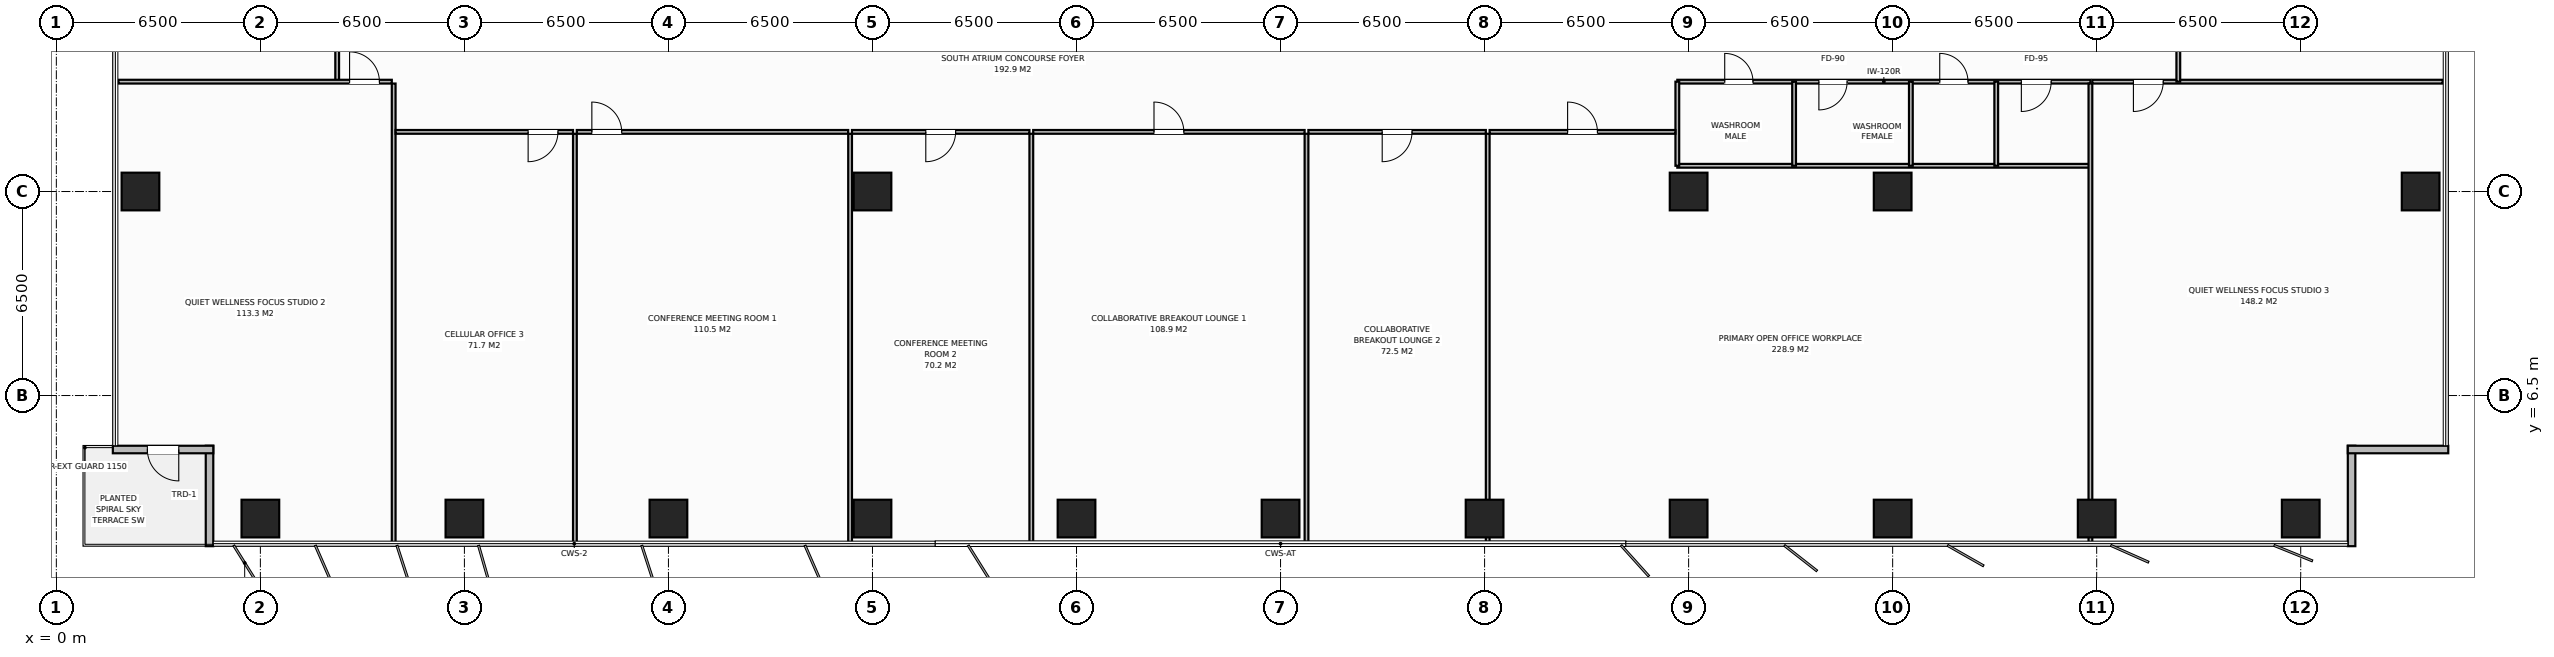
"""IFC4 building model, lengths in metres.
Left out: names, types, materials, properties, quantities, classifications, styles, units other than length and angle.
Written with IfcOpenShell. Run it as: python <this file> out.ifc"""

import sys

from ifc_helpers import new_model, si_unit, direction, frame, frame_2d, origin, origin_2d, place, context, subcontext, project, spatial, rectangle, extrude, element, fill, save


model = new_model("IFC4")
c1 = context("Model", 3, precision=1e-05, world=origin(), true_north=direction((0.0, 1.0)))
c2 = subcontext(c1, "Body", "Model", "MODEL_VIEW")
j1 = project(units=[si_unit("LENGTHUNIT", "METRE"), si_unit("PLANEANGLEUNIT", "RADIAN")], contexts=[c1])
p1 = place(None, origin())
s1 = spatial("IfcSite", under=j1, at=p1, CompositionType="ELEMENT")
p2 = place(p1, origin())
s2 = spatial("IfcBuilding", under=s1, at=p2, CompositionType="ELEMENT")
p3 = place(p2, frame((0.0, 0.0, 101.2)))
s3 = spatial("IfcBuildingStorey", under=s2, at=p3, CompositionType="ELEMENT", Elevation=101.2)
for number, where, z_axis, x_axis in (
    (1, (58.5, 13.0, 0.0), (0.0, 0.0, 1.0), (1.0, 0.0, 0.0)),
    (2, (26.0, 13.0, 0.0), (0.0, 0.0, 1.0), (1.0, 0.0, 0.0)),
    (3, (52.0, 13.0, 0.0), (0.0, 0.0, 1.0), (1.0, 0.0, 0.0)),
    (4, (6.5, 2.58, 0.0), (0.0, 0.0, 1.0), (1.0, 0.0, 0.0)),
    (5, (13.0, 2.58, 0.0), (0.0, 0.0, 1.0), (1.0, 0.0, 0.0)),
    (6, (19.5, 2.58, 0.0), (0.0, 0.0, 1.0), (1.0, 0.0, 0.0)),
    (7, (26.0, 2.58, 0.0), (0.0, 0.0, 1.0), (1.0, 0.0, 0.0)),
    (8, (32.5, 2.58, 0.0), (0.0, 0.0, 1.0), (1.0, 0.0, 0.0)),
    (9, (39.0, 2.58, 0.0), (0.0, 0.0, 1.0), (1.0, 0.0, 0.0)),
    (10, (45.5, 2.58, 0.0), (0.0, 0.0, 1.0), (1.0, 0.0, 0.0)),
    (11, (52.0, 2.58, 0.0), (0.0, 0.0, 1.0), (1.0, 0.0, 0.0)),
    (12, (58.5, 2.58, 0.0), (0.0, 0.0, 1.0), (1.0, 0.0, 0.0)),
    (13, (65.0, 2.58, 0.0), (0.0, 0.0, 1.0), (1.0, 0.0, 0.0)),
    (14, (71.5, 2.58, 0.0), (0.0, 0.0, 1.0), (1.0, 0.0, 0.0)),
    (15, (2.68, 13.0, 0.0), (0.0, 0.0, 1.0), (1.0, 0.0, 0.0)),
    (16, (75.32, 13.0, 0.0), (0.0, 0.0, 1.0), (1.0, 0.0, 0.0)),
):
    element("IfcColumn", number, at=place(p3, frame(where, z_axis=z_axis, x_axis=x_axis)), inside=s3, PredefinedType="COLUMN", context=c2, shape_type="SweptSolid", body=[
        extrude(rectangle(XDim=1.2, YDim=1.2, at=origin_2d()), origin(), (0.0, 0.0, 1.0), 3.8),
    ])
p4 = place(p3, frame((4.88, 1.7, 0.0), z_axis=(0.0, 0.0, 1.0), x_axis=(0.0, 1.0, 0.0)))
e17 = element("IfcWall", 17, at=p4, inside=s3, PredefinedType="STANDARD", context=c2, shape_type="SweptSolid", body=[
    extrude(rectangle(XDim=3.2, YDim=0.24, at=frame_2d((1.6, 0.0))), origin(), (0.0, 0.0, 1.0), 3.565),
])
p5 = place(p3, frame((5.0, 4.78, 0.0), z_axis=(0.0, 0.0, 1.0), x_axis=(-1.0, 0.0, 0.0)))
e18 = element("IfcWall", 18, at=p5, inside=s3, PredefinedType="STANDARD", context=c2, shape_type="SweptSolid", body=[
    extrude(rectangle(XDim=3.2, YDim=0.24, at=frame_2d((1.6, 0.0))), origin(), (0.0, 0.0, 1.0), 3.565),
])
p6 = place(p5, frame((1.1, 0.0, 0.0)))
e19 = element("IfcOpeningElement", 19, at=p6, cuts=e18, PredefinedType="OPENING", context=c2, shape_type="SweptSolid", body=[
    extrude(rectangle(XDim=1.0, YDim=2.2, at=frame_2d((0.5, 1.1))), frame((0.0, 0.13, 0.0), z_axis=(0.0, -1.0, 0.0), x_axis=(1.0, 0.0, 0.0)), (0.0, 0.0, 1.0), 0.26),
])
for number, where, z_axis, x_axis in (
    (20, (73.12, 4.9, 0.0), (0.0, 0.0, 1.0), (0.0, -1.0, 0.0)),
    (21, (76.2, 4.78, 0.0), (0.0, 0.0, 1.0), (-1.0, 0.0, 0.0)),
):
    element("IfcWall", number, at=place(p3, frame(where, z_axis=z_axis, x_axis=x_axis)), inside=s3, PredefinedType="STANDARD", context=c2, shape_type="SweptSolid", body=[
        extrude(rectangle(XDim=3.2, YDim=0.24, at=frame_2d((1.6, 0.0))), origin(), (0.0, 0.0, 1.0), 3.565),
    ])
p7 = place(p3, frame((8.947, 16.5, 0.0), z_axis=(0.0, 0.0, 1.0), x_axis=(0.0, 1.0, 0.0)))
e22 = element("IfcWall", 22, at=p7, inside=s3, PredefinedType="PARTITIONING", context=c2, shape_type="SweptSolid", body=[
    extrude(rectangle(XDim=2.1, YDim=0.12, at=frame_2d((1.05, 0.0))), origin(), (0.0, 0.0, 1.0), 3.565),
])
p8 = place(p3, frame((51.64, 16.5, 0.0), z_axis=(0.0, 0.0, 1.0), x_axis=(1.0, 0.0, 0.0)))
e23 = element("IfcWall", 23, at=p8, inside=s3, PredefinedType="PARTITIONING", context=c2, shape_type="SweptSolid", body=[
    extrude(rectangle(XDim=13.16, YDim=0.12, at=frame_2d((6.58, 0.0))), origin(), (0.0, 0.0, 1.0), 3.565),
])
p9 = place(p8, frame((1.51, 0.0, 0.0)))
e24 = element("IfcOpeningElement", 24, at=p9, cuts=e23, PredefinedType="OPENING", context=c2, shape_type="SweptSolid", body=[
    extrude(rectangle(XDim=0.9, YDim=2.15, at=frame_2d((0.45, 1.075))), frame((0.0, 0.07, 0.0), z_axis=(0.0, -1.0, 0.0), x_axis=(1.0, 0.0, 0.0)), (0.0, 0.0, 1.0), 0.14),
])
p10 = place(p8, frame((4.51, 0.0, 0.0)))
e25 = element("IfcOpeningElement", 25, at=p10, cuts=e23, PredefinedType="OPENING", context=c2, shape_type="SweptSolid", body=[
    extrude(rectangle(XDim=0.9, YDim=2.15, at=frame_2d((0.45, 1.075))), frame((0.0, 0.07, 0.0), z_axis=(0.0, -1.0, 0.0), x_axis=(1.0, 0.0, 0.0)), (0.0, 0.0, 1.0), 0.14),
])
p11 = place(p8, frame((8.36, 0.0, 0.0)))
e26 = element("IfcOpeningElement", 26, at=p11, cuts=e23, PredefinedType="OPENING", context=c2, shape_type="SweptSolid", body=[
    extrude(rectangle(XDim=0.9, YDim=2.15, at=frame_2d((0.45, 1.075))), frame((0.0, 0.07, 0.0), z_axis=(0.0, -1.0, 0.0), x_axis=(1.0, 0.0, 0.0)), (0.0, 0.0, 1.0), 0.14),
])
p12 = place(p8, frame((10.96, 0.0, 0.0)))
e27 = element("IfcOpeningElement", 27, at=p12, cuts=e23, PredefinedType="OPENING", context=c2, shape_type="SweptSolid", body=[
    extrude(rectangle(XDim=0.95, YDim=2.15, at=frame_2d((0.475, 1.075))), frame((0.0, 0.07, 0.0), z_axis=(0.0, -1.0, 0.0), x_axis=(1.0, 0.0, 0.0)), (0.0, 0.0, 1.0), 0.14),
])
p13 = place(p3, frame((51.64, 13.82, 0.0), z_axis=(0.0, 0.0, 1.0), x_axis=(1.0, 0.0, 0.0)))
e28 = element("IfcWall", 28, at=p13, inside=s3, PredefinedType="PARTITIONING", context=c2, shape_type="SweptSolid", body=[
    extrude(rectangle(XDim=13.16, YDim=0.12, at=frame_2d((6.58, 0.0))), origin(), (0.0, 0.0, 1.0), 3.565),
])
for number, where, z_axis, x_axis in (
    (29, (51.64, 13.82, 0.0), (0.0, 0.0, 1.0), (0.0, 1.0, 0.0)),
    (30, (55.36, 13.82, 0.0), (0.0, 0.0, 1.0), (0.0, 1.0, 0.0)),
    (31, (59.08, 13.82, 0.0), (0.0, 0.0, 1.0), (0.0, 1.0, 0.0)),
    (32, (61.8, 13.82, 0.0), (0.0, 0.0, 1.0), (0.0, 1.0, 0.0)),
):
    element("IfcWall", number, at=place(p3, frame(where, z_axis=z_axis, x_axis=x_axis)), inside=s3, PredefinedType="PARTITIONING", context=c2, shape_type="SweptSolid", body=[
        extrude(rectangle(XDim=2.68, YDim=0.12, at=frame_2d((1.34, 0.0))), origin(), (0.0, 0.0, 1.0), 3.565),
    ])
p14 = place(p3, frame((10.747, 1.72, 0.0), z_axis=(0.0, 0.0, 1.0), x_axis=(0.0, 1.0, 0.0)))
e33 = element("IfcWall", 33, at=p14, inside=s3, PredefinedType="PARTITIONING", context=c2, shape_type="SweptSolid", body=[
    extrude(rectangle(XDim=14.72, YDim=0.12, at=frame_2d((7.36, 0.0))), origin(), (0.0, 0.0, 1.0), 3.565),
])
p15 = place(p3, frame((1.98, 16.5, 0.0), z_axis=(0.0, 0.0, 1.0), x_axis=(1.0, 0.0, 0.0)))
e34 = element("IfcWall", 34, at=p15, inside=s3, PredefinedType="PARTITIONING", context=c2, shape_type="SweptSolid", body=[
    extrude(rectangle(XDim=8.707, YDim=0.12, at=frame_2d((4.354, 0.0))), origin(), (0.0, 0.0, 1.0), 3.565),
])
p16 = place(p15, frame((7.362, 0.0, 0.0)))
e35 = element("IfcOpeningElement", 35, at=p16, cuts=e34, PredefinedType="OPENING", context=c2, shape_type="SweptSolid", body=[
    extrude(rectangle(XDim=0.95, YDim=2.15, at=frame_2d((0.475, 1.075))), frame((0.0, 0.07, 0.0), z_axis=(0.0, -1.0, 0.0), x_axis=(1.0, 0.0, 0.0)), (0.0, 0.0, 1.0), 0.14),
])
p17 = place(p3, frame((16.52, 1.72, 0.0), z_axis=(0.0, 0.0, 1.0), x_axis=(0.0, 1.0, 0.0)))
e36 = element("IfcWall", 36, at=p17, inside=s3, PredefinedType="PARTITIONING", context=c2, shape_type="SweptSolid", body=[
    extrude(rectangle(XDim=13.12, YDim=0.12, at=frame_2d((6.56, 0.0))), origin(), (0.0, 0.0, 1.0), 3.565),
])
p18 = place(p3, frame((10.807, 14.9, 0.0), z_axis=(0.0, 0.0, 1.0), x_axis=(1.0, 0.0, 0.0)))
e37 = element("IfcWall", 37, at=p18, inside=s3, PredefinedType="PARTITIONING", context=c2, shape_type="SweptSolid", body=[
    extrude(rectangle(XDim=5.653, YDim=0.12, at=frame_2d((2.827, 0.0))), origin(), (0.0, 0.0, 1.0), 3.565),
])
p19 = place(p18, frame((4.223, 0.0, 0.0)))
e38 = element("IfcOpeningElement", 38, at=p19, cuts=e37, PredefinedType="OPENING", context=c2, shape_type="SweptSolid", body=[
    extrude(rectangle(XDim=0.95, YDim=2.15, at=frame_2d((0.475, 1.075))), frame((0.0, 0.07, 0.0), z_axis=(0.0, -1.0, 0.0), x_axis=(1.0, 0.0, 0.0)), (0.0, 0.0, 1.0), 0.14),
])
p20 = place(p3, frame((25.287, 1.72, 0.0), z_axis=(0.0, 0.0, 1.0), x_axis=(0.0, 1.0, 0.0)))
e39 = element("IfcWall", 39, at=p20, inside=s3, PredefinedType="PARTITIONING", context=c2, shape_type="SweptSolid", body=[
    extrude(rectangle(XDim=13.12, YDim=0.12, at=frame_2d((6.56, 0.0))), origin(), (0.0, 0.0, 1.0), 3.565),
])
p21 = place(p3, frame((16.58, 14.9, 0.0), z_axis=(0.0, 0.0, 1.0), x_axis=(1.0, 0.0, 0.0)))
e40 = element("IfcWall", 40, at=p21, inside=s3, PredefinedType="PARTITIONING", context=c2, shape_type="SweptSolid", body=[
    extrude(rectangle(XDim=8.647, YDim=0.12, at=frame_2d((4.323, 0.0))), origin(), (0.0, 0.0, 1.0), 3.565),
])
p22 = place(p21, frame((0.48, 0.0, 0.0)))
e41 = element("IfcOpeningElement", 41, at=p22, cuts=e40, PredefinedType="OPENING", context=c2, shape_type="SweptSolid", body=[
    extrude(rectangle(XDim=0.95, YDim=2.15, at=frame_2d((0.475, 1.075))), frame((0.0, 0.07, 0.0), z_axis=(0.0, -1.0, 0.0), x_axis=(1.0, 0.0, 0.0)), (0.0, 0.0, 1.0), 0.14),
])
p23 = place(p3, frame((31.06, 1.72, 0.0), z_axis=(0.0, 0.0, 1.0), x_axis=(0.0, 1.0, 0.0)))
e42 = element("IfcWall", 42, at=p23, inside=s3, PredefinedType="PARTITIONING", context=c2, shape_type="SweptSolid", body=[
    extrude(rectangle(XDim=13.12, YDim=0.12, at=frame_2d((6.56, 0.0))), origin(), (0.0, 0.0, 1.0), 3.565),
])
p24 = place(p3, frame((25.347, 14.9, 0.0), z_axis=(0.0, 0.0, 1.0), x_axis=(1.0, 0.0, 0.0)))
e43 = element("IfcWall", 43, at=p24, inside=s3, PredefinedType="PARTITIONING", context=c2, shape_type="SweptSolid", body=[
    extrude(rectangle(XDim=5.653, YDim=0.12, at=frame_2d((2.827, 0.0))), origin(), (0.0, 0.0, 1.0), 3.565),
])
p25 = place(p24, frame((2.352, 0.0, 0.0)))
e44 = element("IfcOpeningElement", 44, at=p25, cuts=e43, PredefinedType="OPENING", context=c2, shape_type="SweptSolid", body=[
    extrude(rectangle(XDim=0.95, YDim=2.15, at=frame_2d((0.475, 1.075))), frame((0.0, 0.07, 0.0), z_axis=(0.0, -1.0, 0.0), x_axis=(1.0, 0.0, 0.0)), (0.0, 0.0, 1.0), 0.14),
])
p26 = place(p3, frame((39.827, 1.72, 0.0), z_axis=(0.0, 0.0, 1.0), x_axis=(0.0, 1.0, 0.0)))
e45 = element("IfcWall", 45, at=p26, inside=s3, PredefinedType="PARTITIONING", context=c2, shape_type="SweptSolid", body=[
    extrude(rectangle(XDim=13.12, YDim=0.12, at=frame_2d((6.56, 0.0))), origin(), (0.0, 0.0, 1.0), 3.565),
])
p27 = place(p3, frame((31.12, 14.9, 0.0), z_axis=(0.0, 0.0, 1.0), x_axis=(1.0, 0.0, 0.0)))
e46 = element("IfcWall", 46, at=p27, inside=s3, PredefinedType="PARTITIONING", context=c2, shape_type="SweptSolid", body=[
    extrude(rectangle(XDim=8.647, YDim=0.12, at=frame_2d((4.323, 0.0))), origin(), (0.0, 0.0, 1.0), 3.565),
])
p28 = place(p27, frame((3.848, 0.0, 0.0)))
e47 = element("IfcOpeningElement", 47, at=p28, cuts=e46, PredefinedType="OPENING", context=c2, shape_type="SweptSolid", body=[
    extrude(rectangle(XDim=0.95, YDim=2.15, at=frame_2d((0.475, 1.075))), frame((0.0, 0.07, 0.0), z_axis=(0.0, -1.0, 0.0), x_axis=(1.0, 0.0, 0.0)), (0.0, 0.0, 1.0), 0.14),
])
p29 = place(p3, frame((45.6, 1.72, 0.0), z_axis=(0.0, 0.0, 1.0), x_axis=(0.0, 1.0, 0.0)))
e48 = element("IfcWall", 48, at=p29, inside=s3, PredefinedType="PARTITIONING", context=c2, shape_type="SweptSolid", body=[
    extrude(rectangle(XDim=13.12, YDim=0.12, at=frame_2d((6.56, 0.0))), origin(), (0.0, 0.0, 1.0), 2.965),
])
p30 = place(p3, frame((39.887, 14.9, 0.0), z_axis=(0.0, 0.0, 1.0), x_axis=(1.0, 0.0, 0.0)))
e49 = element("IfcWall", 49, at=p30, inside=s3, PredefinedType="PARTITIONING", context=c2, shape_type="SweptSolid", body=[
    extrude(rectangle(XDim=5.653, YDim=0.12, at=frame_2d((2.827, 0.0))), origin(), (0.0, 0.0, 1.0), 3.565),
])
p31 = place(p30, frame((2.352, 0.0, 0.0)))
e50 = element("IfcOpeningElement", 50, at=p31, cuts=e49, PredefinedType="OPENING", context=c2, shape_type="SweptSolid", body=[
    extrude(rectangle(XDim=0.95, YDim=2.15, at=frame_2d((0.475, 1.075))), frame((0.0, 0.07, 0.0), z_axis=(0.0, -1.0, 0.0), x_axis=(1.0, 0.0, 0.0)), (0.0, 0.0, 1.0), 0.14),
])
p32 = place(p3, frame((64.8, 1.72, 0.0), z_axis=(0.0, 0.0, 1.0), x_axis=(0.0, 1.0, 0.0)))
e51 = element("IfcWall", 51, at=p32, inside=s3, PredefinedType="PARTITIONING", context=c2, shape_type="SweptSolid", body=[
    extrude(rectangle(XDim=14.72, YDim=0.12, at=frame_2d((7.36, 0.0))), origin(), (0.0, 0.0, 1.0), 2.965),
])
p33 = place(p3, frame((45.66, 14.9, 0.0), z_axis=(0.0, 0.0, 1.0), x_axis=(1.0, 0.0, 0.0)))
e52 = element("IfcWall", 52, at=p33, inside=s3, PredefinedType="PARTITIONING", context=c2, shape_type="SweptSolid", body=[
    extrude(rectangle(XDim=5.92, YDim=0.12, at=frame_2d((2.96, 0.0))), origin(), (0.0, 0.0, 1.0), 3.565),
])
p34 = place(p33, frame((2.485, 0.0, 0.0)))
e53 = element("IfcOpeningElement", 53, at=p34, cuts=e52, PredefinedType="OPENING", context=c2, shape_type="SweptSolid", body=[
    extrude(rectangle(XDim=0.95, YDim=2.15, at=frame_2d((0.475, 1.075))), frame((0.0, 0.07, 0.0), z_axis=(0.0, -1.0, 0.0), x_axis=(1.0, 0.0, 0.0)), (0.0, 0.0, 1.0), 0.14),
])
p35 = place(p3, frame((64.86, 16.5, 0.0), z_axis=(0.0, 0.0, 1.0), x_axis=(1.0, 0.0, 0.0)))
e54 = element("IfcWall", 54, at=p35, inside=s3, PredefinedType="PARTITIONING", context=c2, shape_type="SweptSolid", body=[
    extrude(rectangle(XDim=11.16, YDim=0.12, at=frame_2d((5.58, 0.0))), origin(), (0.0, 0.0, 1.0), 3.565),
])
p36 = place(p35, frame((1.31, 0.0, 0.0)))
e55 = element("IfcOpeningElement", 55, at=p36, cuts=e54, PredefinedType="OPENING", context=c2, shape_type="SweptSolid", body=[
    extrude(rectangle(XDim=0.95, YDim=2.15, at=frame_2d((0.475, 1.075))), frame((0.0, 0.07, 0.0), z_axis=(0.0, -1.0, 0.0), x_axis=(1.0, 0.0, 0.0)), (0.0, 0.0, 1.0), 0.14),
])
p37 = place(p3, frame((67.6, 16.5, 0.0), z_axis=(0.0, 0.0, 1.0), x_axis=(0.0, 1.0, 0.0)))
e56 = element("IfcWall", 56, at=p37, inside=s3, PredefinedType="PARTITIONING", context=c2, shape_type="SweptSolid", body=[
    extrude(rectangle(XDim=9.5, YDim=0.12, at=frame_2d((4.75, 0.0))), origin(), (0.0, 0.0, 1.0), 3.565),
])
p38 = place(p37, frame((5.325, 0.0, 0.0)))
e57 = element("IfcOpeningElement", 57, at=p38, cuts=e56, PredefinedType="OPENING", context=c2, shape_type="SweptSolid", body=[
    extrude(rectangle(XDim=0.95, YDim=2.15, at=frame_2d((0.475, 1.075))), frame((0.0, 0.07, 0.0), z_axis=(0.0, -1.0, 0.0), x_axis=(1.0, 0.0, 0.0)), (0.0, 0.0, 1.0), 0.14),
])
p39 = place(p6, origin())
e58 = element("IfcDoor", 58, at=p39, inside=s3, OperationType="SINGLE_SWING_LEFT", PredefinedType="DOOR", context=c2, shape_type="SweptSolid", body=[
    extrude(rectangle(XDim=1.0, YDim=2.2, at=frame_2d((0.5, 1.1))), frame((0.0, 0.025, 0.0), z_axis=(0.0, -1.0, 0.0), x_axis=(1.0, 0.0, 0.0)), (0.0, 0.0, 1.0), 0.05),
])
fill(e19, e58)
p40 = place(p9, origin())
e59 = element("IfcDoor", 59, at=p40, inside=s3, OperationType="SINGLE_SWING_LEFT", PredefinedType="DOOR", context=c2, shape_type="SweptSolid", body=[
    extrude(rectangle(XDim=0.9, YDim=2.15, at=frame_2d((0.45, 1.075))), frame((0.0, 0.025, 0.0), z_axis=(0.0, -1.0, 0.0), x_axis=(1.0, 0.0, 0.0)), (0.0, 0.0, 1.0), 0.05),
])
fill(e24, e59)
p41 = place(p10, origin())
e60 = element("IfcDoor", 60, at=p41, inside=s3, OperationType="SINGLE_SWING_RIGHT", PredefinedType="DOOR", context=c2, shape_type="SweptSolid", body=[
    extrude(rectangle(XDim=0.9, YDim=2.15, at=frame_2d((0.45, 1.075))), frame((0.0, 0.025, 0.0), z_axis=(0.0, -1.0, 0.0), x_axis=(1.0, 0.0, 0.0)), (0.0, 0.0, 1.0), 0.05),
])
fill(e25, e60)
p42 = place(p11, origin())
e61 = element("IfcDoor", 61, at=p42, inside=s3, OperationType="SINGLE_SWING_LEFT", PredefinedType="DOOR", context=c2, shape_type="SweptSolid", body=[
    extrude(rectangle(XDim=0.9, YDim=2.15, at=frame_2d((0.45, 1.075))), frame((0.0, 0.025, 0.0), z_axis=(0.0, -1.0, 0.0), x_axis=(1.0, 0.0, 0.0)), (0.0, 0.0, 1.0), 0.05),
])
fill(e26, e61)
p43 = place(p12, origin())
e62 = element("IfcDoor", 62, at=p43, inside=s3, OperationType="SINGLE_SWING_RIGHT", PredefinedType="DOOR", context=c2, shape_type="SweptSolid", body=[
    extrude(rectangle(XDim=0.95, YDim=2.15, at=frame_2d((0.475, 1.075))), frame((0.0, 0.025, 0.0), z_axis=(0.0, -1.0, 0.0), x_axis=(1.0, 0.0, 0.0)), (0.0, 0.0, 1.0), 0.05),
])
fill(e27, e62)
p44 = place(p16, origin())
e63 = element("IfcDoor", 63, at=p44, inside=s3, OperationType="SINGLE_SWING_LEFT", PredefinedType="DOOR", context=c2, shape_type="SweptSolid", body=[
    extrude(rectangle(XDim=0.95, YDim=2.15, at=frame_2d((0.475, 1.075))), frame((0.0, 0.025, 0.0), z_axis=(0.0, -1.0, 0.0), x_axis=(1.0, 0.0, 0.0)), (0.0, 0.0, 1.0), 0.05),
])
fill(e35, e63)
p45 = place(p19, origin())
e64 = element("IfcDoor", 64, at=p45, inside=s3, OperationType="SINGLE_SWING_RIGHT", PredefinedType="DOOR", context=c2, shape_type="SweptSolid", body=[
    extrude(rectangle(XDim=0.95, YDim=2.15, at=frame_2d((0.475, 1.075))), frame((0.0, 0.025, 0.0), z_axis=(0.0, -1.0, 0.0), x_axis=(1.0, 0.0, 0.0)), (0.0, 0.0, 1.0), 0.05),
])
fill(e38, e64)
p46 = place(p22, origin())
e65 = element("IfcDoor", 65, at=p46, inside=s3, OperationType="SINGLE_SWING_LEFT", PredefinedType="DOOR", context=c2, shape_type="SweptSolid", body=[
    extrude(rectangle(XDim=0.95, YDim=2.15, at=frame_2d((0.475, 1.075))), frame((0.0, 0.025, 0.0), z_axis=(0.0, -1.0, 0.0), x_axis=(1.0, 0.0, 0.0)), (0.0, 0.0, 1.0), 0.05),
])
fill(e41, e65)
p47 = place(p25, origin())
e66 = element("IfcDoor", 66, at=p47, inside=s3, OperationType="SINGLE_SWING_RIGHT", PredefinedType="DOOR", context=c2, shape_type="SweptSolid", body=[
    extrude(rectangle(XDim=0.95, YDim=2.15, at=frame_2d((0.475, 1.075))), frame((0.0, 0.025, 0.0), z_axis=(0.0, -1.0, 0.0), x_axis=(1.0, 0.0, 0.0)), (0.0, 0.0, 1.0), 0.05),
])
fill(e44, e66)
p48 = place(p28, origin())
e67 = element("IfcDoor", 67, at=p48, inside=s3, OperationType="SINGLE_SWING_LEFT", PredefinedType="DOOR", context=c2, shape_type="SweptSolid", body=[
    extrude(rectangle(XDim=0.95, YDim=2.15, at=frame_2d((0.475, 1.075))), frame((0.0, 0.025, 0.0), z_axis=(0.0, -1.0, 0.0), x_axis=(1.0, 0.0, 0.0)), (0.0, 0.0, 1.0), 0.05),
])
fill(e47, e67)
p49 = place(p31, origin())
e68 = element("IfcDoor", 68, at=p49, inside=s3, OperationType="SINGLE_SWING_RIGHT", PredefinedType="DOOR", context=c2, shape_type="SweptSolid", body=[
    extrude(rectangle(XDim=0.95, YDim=2.15, at=frame_2d((0.475, 1.075))), frame((0.0, 0.025, 0.0), z_axis=(0.0, -1.0, 0.0), x_axis=(1.0, 0.0, 0.0)), (0.0, 0.0, 1.0), 0.05),
])
fill(e50, e68)
p50 = place(p34, origin())
e69 = element("IfcDoor", 69, at=p50, inside=s3, OperationType="SINGLE_SWING_LEFT", PredefinedType="DOOR", context=c2, shape_type="SweptSolid", body=[
    extrude(rectangle(XDim=0.95, YDim=2.15, at=frame_2d((0.475, 1.075))), frame((0.0, 0.025, 0.0), z_axis=(0.0, -1.0, 0.0), x_axis=(1.0, 0.0, 0.0)), (0.0, 0.0, 1.0), 0.05),
])
fill(e53, e69)
p51 = place(p36, origin())
e70 = element("IfcDoor", 70, at=p51, inside=s3, OperationType="SINGLE_SWING_RIGHT", PredefinedType="DOOR", context=c2, shape_type="SweptSolid", body=[
    extrude(rectangle(XDim=0.95, YDim=2.15, at=frame_2d((0.475, 1.075))), frame((0.0, 0.025, 0.0), z_axis=(0.0, -1.0, 0.0), x_axis=(1.0, 0.0, 0.0)), (0.0, 0.0, 1.0), 0.05),
])
fill(e55, e70)
save(model, sys.argv[1])
